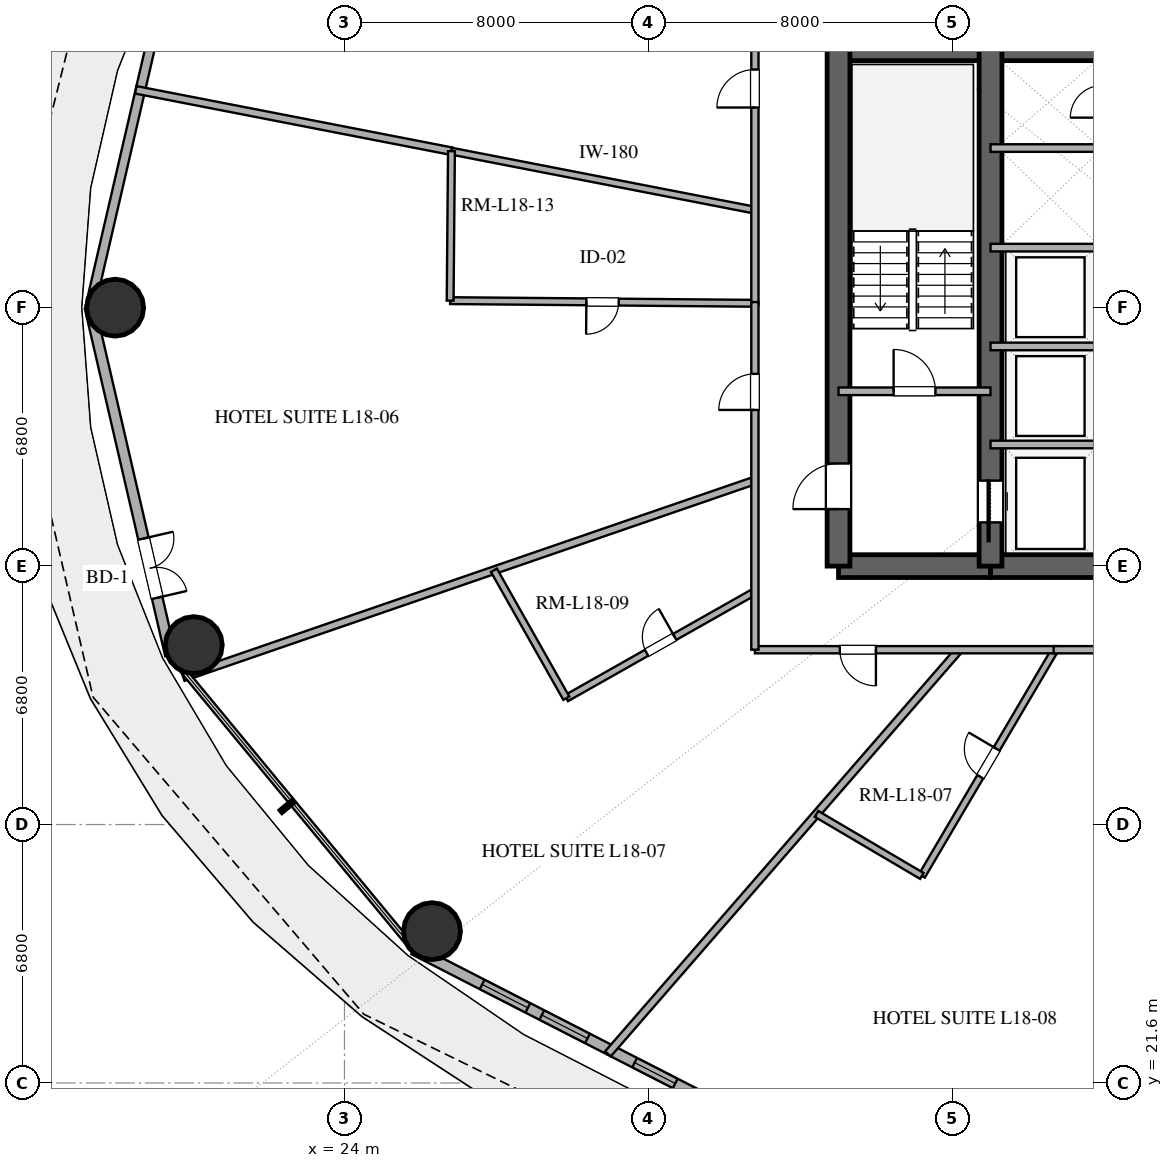
"""IFC4 building model, lengths in metres.
Left out: names, types, materials, properties, quantities, classifications, styles, units other than length and angle.
Written with IfcOpenShell. Run it as: python <this file> out.ifc"""

import sys

from ifc_helpers import new_model, si_unit, direction, frame, frame_2d, origin, origin_2d, place, context, subcontext, project, spatial, rectangle, hollow_circle, extrude, element, fill, save


model = new_model("IFC4")
c1 = context("Model", 3, precision=1e-05, world=origin(), true_north=direction((0.0, 1.0)))
c2 = subcontext(c1, "Body", "Model", "MODEL_VIEW")
j1 = project(units=[si_unit("LENGTHUNIT", "METRE"), si_unit("PLANEANGLEUNIT", "RADIAN")], contexts=[c1])
p1 = place(None, origin())
s1 = spatial("IfcSite", under=j1, at=p1, CompositionType="ELEMENT")
p2 = place(p1, origin())
s2 = spatial("IfcBuilding", under=s1, at=p2, CompositionType="ELEMENT")
p3 = place(p2, frame((0.0, 0.0, 75.0)))
s3 = spatial("IfcBuildingStorey", under=s2, at=p3, CompositionType="ELEMENT", Elevation=75.0)
p4 = place(p3, frame((37.0, 35.2, 0.0), z_axis=(0.0, 0.0, 1.0), x_axis=(1.0, 0.0, 0.0)))
e1 = element("IfcWall", 1, at=p4, inside=s3, PredefinedType="SHEAR", context=c2, shape_type="SweptSolid", body=[
    extrude(rectangle(XDim=4.0, YDim=0.6, at=frame_2d((2.0, 0.0))), origin(), (0.0, 0.0, 1.0), 3.25),
])
p5 = place(p3, frame((41.0, 35.2, 0.0), z_axis=(0.0, 0.0, 1.0), x_axis=(1.0, 0.0, 0.0)))
e2 = element("IfcWall", 2, at=p5, inside=s3, PredefinedType="SHEAR", context=c2, shape_type="SweptSolid", body=[
    extrude(rectangle(XDim=14.0, YDim=0.6, at=frame_2d((7.0, 0.0))), origin(), (0.0, 0.0, 1.0), 3.25),
])
p6 = place(p5, frame((6.1, 0.0, 0.0)))
e3 = element("IfcOpeningElement", 3, at=p6, cuts=e2, PredefinedType="OPENING", context=c2, shape_type="SweptSolid", body=[
    extrude(rectangle(XDim=1.8, YDim=2.25, at=frame_2d((0.9, 1.125))), frame((0.0, 0.31, 0.0), z_axis=(0.0, -1.0, 0.0), x_axis=(1.0, 0.0, 0.0)), (0.0, 0.0, 1.0), 0.62),
])
p7 = place(p3, frame((37.0, 48.8, 0.0), z_axis=(0.0, 0.0, 1.0), x_axis=(1.0, 0.0, 0.0)))
e4 = element("IfcWall", 4, at=p7, inside=s3, PredefinedType="SHEAR", context=c2, shape_type="SweptSolid", body=[
    extrude(rectangle(XDim=4.0, YDim=0.6, at=frame_2d((2.0, 0.0))), origin(), (0.0, 0.0, 1.0), 3.25),
])
p8 = place(p3, frame((41.0, 48.8, 0.0), z_axis=(0.0, 0.0, 1.0), x_axis=(1.0, 0.0, 0.0)))
e5 = element("IfcWall", 5, at=p8, inside=s3, PredefinedType="SHEAR", context=c2, shape_type="SweptSolid", body=[
    extrude(rectangle(XDim=14.0, YDim=0.6, at=frame_2d((7.0, 0.0))), origin(), (0.0, 0.0, 1.0), 3.25),
])
p9 = place(p8, frame((6.1, 0.0, 0.0)))
e6 = element("IfcOpeningElement", 6, at=p9, cuts=e5, PredefinedType="OPENING", context=c2, shape_type="SweptSolid", body=[
    extrude(rectangle(XDim=1.8, YDim=2.25, at=frame_2d((0.9, 1.125))), frame((0.0, 0.31, 0.0), z_axis=(0.0, -1.0, 0.0), x_axis=(1.0, 0.0, 0.0)), (0.0, 0.0, 1.0), 0.62),
])
p10 = place(p3, frame((37.0, 35.2, 0.0), z_axis=(0.0, 0.0, 1.0), x_axis=(0.0, 1.0, 0.0)))
e7 = element("IfcWall", 7, at=p10, inside=s3, PredefinedType="SHEAR", context=c2, shape_type="SweptSolid", body=[
    extrude(rectangle(XDim=13.6, YDim=0.6, at=frame_2d((6.8, 0.0))), origin(), (0.0, 0.0, 1.0), 3.25),
])
p11 = place(p10, frame((1.5, 0.0, 0.0)))
e8 = element("IfcOpeningElement", 8, at=p11, cuts=e7, PredefinedType="OPENING", context=c2, shape_type="SweptSolid", body=[
    extrude(rectangle(XDim=1.2, YDim=2.15, at=frame_2d((0.6, 1.075))), frame((0.0, 0.31, 0.0), z_axis=(0.0, -1.0, 0.0), x_axis=(1.0, 0.0, 0.0)), (0.0, 0.0, 1.0), 0.62),
])
p12 = place(p3, frame((41.0, 35.2, 0.0), z_axis=(0.0, 0.0, 1.0), x_axis=(0.0, 1.0, 0.0)))
e9 = element("IfcWall", 9, at=p12, inside=s3, PredefinedType="SHEAR", context=c2, shape_type="SweptSolid", body=[
    extrude(rectangle(XDim=13.6, YDim=0.6, at=frame_2d((6.8, 0.0))), origin(), (0.0, 0.0, 1.0), 3.25),
])
p13 = place(p12, frame((1.15, 0.0, 0.0)))
e10 = element("IfcOpeningElement", 10, at=p13, cuts=e9, PredefinedType="OPENING", context=c2, shape_type="SweptSolid", body=[
    extrude(rectangle(XDim=1.1, YDim=2.2, at=frame_2d((0.55, 1.1))), frame((0.0, 0.31, 0.0), z_axis=(0.0, -1.0, 0.0), x_axis=(1.0, 0.0, 0.0)), (0.0, 0.0, 1.0), 0.62),
])
for number, where, z_axis, x_axis in (
    (11, (17.965, 42.0, 0.0), (0.0, 0.0, 1.0), (1.0, 0.0, 0.0)),
    (12, (20.034, 33.122, 0.0), (0.0, 0.0, 1.0), (1.0, 0.0, 0.0)),
    (13, (26.303, 25.595, 0.0), (0.0, 0.0, 1.0), (1.0, 0.0, 0.0)),
):
    element("IfcColumn", number, at=place(p3, frame(where, z_axis=z_axis, x_axis=x_axis)), inside=s3, PredefinedType="COLUMN", context=c2, shape_type="SweptSolid", body=[
        extrude(hollow_circle(Radius=0.75, WallThickness=0.04, at=origin_2d()), origin(), (0.0, 0.0, 1.0), 3.25),
    ])
p14 = place(p3, frame((19.419, 51.138, 0.0), z_axis=(0.0, 0.0, 1.0), x_axis=(-0.225454452941, -0.974253709076, 0.0)))
e14 = element("IfcWall", 14, at=p14, inside=s3, PredefinedType="SOLIDWALL", context=c2, shape_type="SweptSolid", body=[
    extrude(rectangle(XDim=9.38, YDim=0.25, at=frame_2d((4.69, 0.0))), origin(), (0.0, 0.0, 1.0), 3.25),
])
p15 = place(p3, frame((17.304, 42.0, 0.0), z_axis=(0.0, 0.0, 1.0), x_axis=(0.225454452941, -0.974253709076, 0.0)))
e15 = element("IfcWall", 15, at=p15, inside=s3, PredefinedType="SOLIDWALL", context=c2, shape_type="SweptSolid", body=[
    extrude(rectangle(XDim=9.38, YDim=0.28, at=frame_2d((4.69, 0.0))), origin(), (0.0, 0.0, 1.0), 3.25),
])
p16 = place(p15, frame((6.235, 0.0, 0.0)))
e16 = element("IfcOpeningElement", 16, at=p16, cuts=e15, PredefinedType="OPENING", context=c2, shape_type="SweptSolid", body=[
    extrude(rectangle(XDim=1.6, YDim=2.25, at=frame_2d((0.8, 1.125))), frame((0.0, 0.15, 0.0), z_axis=(0.0, -1.0, 0.0), x_axis=(1.0, 0.0, 0.0)), (0.0, 0.0, 1.0), 0.3),
])
p17 = place(p3, frame((25.826, 25.114, 0.0), z_axis=(0.0, 0.0, 1.0), x_axis=(0.889853976658, -0.456245438581, 0.0)))
e17 = element("IfcWall", 17, at=p17, inside=s3, PredefinedType="SOLIDWALL", context=c2, shape_type="SweptSolid", body=[
    extrude(rectangle(XDim=11.346, YDim=0.28, at=frame_2d((5.673, 0.0))), origin(), (0.0, 0.0, 1.0), 3.25),
])
p18 = place(p17, frame((2.02, 0.0, 0.85)))
e18 = element("IfcOpeningElement", 18, at=p18, cuts=e17, PredefinedType="OPENING", context=c2, shape_type="SweptSolid", body=[
    extrude(rectangle(XDim=1.35, YDim=1.8, at=frame_2d((0.675, 0.9))), frame((0.0, 0.15, 0.0), z_axis=(0.0, -1.0, 0.0), x_axis=(1.0, 0.0, 0.0)), (0.0, 0.0, 1.0), 0.3),
])
p19 = place(p17, frame((3.784, 0.0, 0.85)))
e19 = element("IfcOpeningElement", 19, at=p19, cuts=e17, PredefinedType="OPENING", context=c2, shape_type="SweptSolid", body=[
    extrude(rectangle(XDim=1.35, YDim=1.8, at=frame_2d((0.675, 0.9))), frame((0.0, 0.15, 0.0), z_axis=(0.0, -1.0, 0.0), x_axis=(1.0, 0.0, 0.0)), (0.0, 0.0, 1.0), 0.3),
])
p20 = place(p17, frame((6.529, 0.0, 0.85)))
e20 = element("IfcOpeningElement", 20, at=p20, cuts=e17, PredefinedType="OPENING", context=c2, shape_type="SweptSolid", body=[
    extrude(rectangle(XDim=1.2, YDim=1.8, at=frame_2d((0.6, 0.9))), frame((0.0, 0.15, 0.0), z_axis=(0.0, -1.0, 0.0), x_axis=(1.0, 0.0, 0.0)), (0.0, 0.0, 1.0), 0.3),
])
p21 = place(p17, frame((8.21, 0.0, 0.85)))
e21 = element("IfcOpeningElement", 21, at=p21, cuts=e17, PredefinedType="OPENING", context=c2, shape_type="SweptSolid", body=[
    extrude(rectangle(XDim=1.2, YDim=1.8, at=frame_2d((0.6, 0.9))), frame((0.0, 0.15, 0.0), z_axis=(0.0, -1.0, 0.0), x_axis=(1.0, 0.0, 0.0)), (0.0, 0.0, 1.0), 0.3),
])
p22 = place(p3, frame((37.0, 39.8, 0.0), z_axis=(0.0, 0.0, 1.0), x_axis=(1.0, 0.0, 0.0)))
e22 = element("IfcWall", 22, at=p22, inside=s3, PredefinedType="SOLIDWALL", context=c2, shape_type="SweptSolid", body=[
    extrude(rectangle(XDim=4.0, YDim=0.2, at=frame_2d((2.0, 0.0))), origin(), (0.0, 0.0, 1.0), 2.61),
])
p23 = place(p22, frame((1.45, 0.0, 0.0)))
e23 = element("IfcOpeningElement", 23, at=p23, cuts=e22, PredefinedType="OPENING", context=c2, shape_type="SweptSolid", body=[
    extrude(rectangle(XDim=1.1, YDim=2.15, at=frame_2d((0.55, 1.075))), frame((0.0, 0.11, 0.0), z_axis=(0.0, -1.0, 0.0), x_axis=(1.0, 0.0, 0.0)), (0.0, 0.0, 1.0), 0.22),
])
for number, where, z_axis, x_axis in (
    (24, (41.0, 38.4, 0.0), (0.0, 0.0, 1.0), (1.0, 0.0, 0.0)),
    (25, (41.0, 46.2, 0.0), (0.0, 0.0, 1.0), (1.0, 0.0, 0.0)),
    (26, (41.0, 40.98, 0.0), (0.0, 0.0, 1.0), (1.0, 0.0, 0.0)),
    (27, (41.0, 43.58, 0.0), (0.0, 0.0, 1.0), (1.0, 0.0, 0.0)),
):
    element("IfcWall", number, at=place(p3, frame(where, z_axis=z_axis, x_axis=x_axis)), inside=s3, PredefinedType="SOLIDWALL", context=c2, shape_type="SweptSolid", body=[
        extrude(rectangle(XDim=2.95, YDim=0.2, at=frame_2d((1.475, 0.0))), origin(), (0.0, 0.0, 1.0), 2.61),
    ])
p24 = place(p3, frame((43.467, 18.681, 0.0), z_axis=(0.0, 0.0, 1.0), x_axis=(0.190799326792, 0.981629062781, 0.0)))
e28 = element("IfcWall", 28, at=p24, inside=s3, PredefinedType="PARTITIONING", context=c2, shape_type="SweptSolid", body=[
    extrude(rectangle(XDim=14.587, YDim=0.2, at=frame_2d((7.293, 0.0))), origin(), (0.0, 0.0, 1.0), 2.61),
])
p25 = place(p3, frame((34.8, 37.455, 0.0), z_axis=(0.0, 0.0, 1.0), x_axis=(-0.945518845989, -0.325567369186, 0.0)))
e29 = element("IfcWall", 29, at=p25, inside=s3, PredefinedType="PARTITIONING", context=c2, shape_type="SweptSolid", body=[
    extrude(rectangle(XDim=15.909, YDim=0.2, at=frame_2d((7.955, 0.0))), origin(), (0.0, 0.0, 1.0), 2.61),
])
p26 = place(p3, frame((18.508, 47.733, 0.0), z_axis=(0.0, 0.0, 1.0), x_axis=(0.981626048747, -0.190814832812, 0.0)))
e30 = element("IfcWall", 30, at=p26, inside=s3, PredefinedType="PARTITIONING", context=c2, shape_type="SweptSolid", body=[
    extrude(rectangle(XDim=8.462, YDim=0.2, at=frame_2d((4.231, 0.0))), origin(), (0.0, 0.0, 1.0), 2.61),
])
p27 = place(p3, frame((40.177, 33.0, 0.0), z_axis=(0.0, 0.0, 1.0), x_axis=(-0.656066321773, -0.754703240641, 0.0)))
e31 = element("IfcWall", 31, at=p27, inside=s3, PredefinedType="PARTITIONING", context=c2, shape_type="SweptSolid", body=[
    extrude(rectangle(XDim=14.091, YDim=0.2, at=frame_2d((7.045, 0.0))), origin(), (0.0, 0.0, 1.0), 2.61),
])
p28 = place(p3, frame((26.815, 46.118, 0.0), z_axis=(0.0, 0.0, 1.0), x_axis=(0.981631630513, -0.190786115787, 0.0)))
e32 = element("IfcWall", 32, at=p28, inside=s3, PredefinedType="PLUMBINGWALL", context=c2, shape_type="SweptSolid", body=[
    extrude(rectangle(XDim=8.135, YDim=0.18, at=frame_2d((4.067, 0.0))), origin(), (0.0, 0.0, 1.0), 2.61),
])
p29 = place(p3, frame((34.8, 42.115, 0.0), z_axis=(0.0, 0.0, 1.0), x_axis=(-0.999961832732, 0.008736880358, 0.0)))
e33 = element("IfcWall", 33, at=p29, inside=s3, PredefinedType="PLUMBINGWALL", context=c2, shape_type="SweptSolid", body=[
    extrude(rectangle(XDim=8.02, YDim=0.18, at=frame_2d((4.01, 0.0))), origin(), (0.0, 0.0, 1.0), 2.61),
])
p30 = place(p29, frame((3.585, 0.0, 0.0)))
e34 = element("IfcOpeningElement", 34, at=p30, cuts=e33, PredefinedType="OPENING", context=c2, shape_type="SweptSolid", body=[
    extrude(rectangle(XDim=0.85, YDim=2.1, at=frame_2d((0.425, 1.05))), frame((0.0, 0.1, 0.0), z_axis=(0.0, -1.0, 0.0), x_axis=(1.0, 0.0, 0.0)), (0.0, 0.0, 1.0), 0.2),
])
p31 = place(p3, frame((39.193, 27.048, 0.0), z_axis=(0.0, 0.0, 1.0), x_axis=(0.507529744585, 0.861634236995, 0.0)))
e35 = element("IfcWall", 35, at=p31, inside=s3, PredefinedType="PLUMBINGWALL", context=c2, shape_type="SweptSolid", body=[
    extrude(rectangle(XDim=6.908, YDim=0.18, at=frame_2d((3.454, 0.0))), origin(), (0.0, 0.0, 1.0), 2.61),
])
p32 = place(p31, frame((3.029, 0.0, 0.0)))
e36 = element("IfcOpeningElement", 36, at=p32, cuts=e35, PredefinedType="OPENING", context=c2, shape_type="SweptSolid", body=[
    extrude(rectangle(XDim=0.85, YDim=2.1, at=frame_2d((0.425, 1.05))), frame((0.0, 0.1, 0.0), z_axis=(0.0, -1.0, 0.0), x_axis=(1.0, 0.0, 0.0)), (0.0, 0.0, 1.0), 0.2),
])
p33 = place(p3, frame((34.8, 42.083, 0.0), z_axis=(0.0, 0.0, 1.0), x_axis=(0.0, 1.0, 0.0)))
e37 = element("IfcWall", 37, at=p33, inside=s3, PredefinedType="PARTITIONING", context=c2, shape_type="SweptSolid", body=[
    extrude(rectangle(XDim=8.917, YDim=0.19, at=frame_2d((4.458, 0.0))), origin(), (0.0, 0.0, 1.0), 2.61),
])
p34 = place(p33, frame((5.183, 0.0, 0.0)))
e38 = element("IfcOpeningElement", 38, at=p34, cuts=e37, PredefinedType="OPENING", context=c2, shape_type="SweptSolid", body=[
    extrude(rectangle(XDim=1.0, YDim=2.2, at=frame_2d((0.5, 1.1))), frame((0.0, 0.105, 0.0), z_axis=(0.0, -1.0, 0.0), x_axis=(1.0, 0.0, 0.0)), (0.0, 0.0, 1.0), 0.21),
])
p35 = place(p3, frame((29.837, 31.724, 0.0), z_axis=(0.0, 0.0, 1.0), x_axis=(0.870364197206, 0.492408533865, 0.0)))
e39 = element("IfcWall", 39, at=p35, inside=s3, PredefinedType="PLUMBINGWALL", context=c2, shape_type="SweptSolid", body=[
    extrude(rectangle(XDim=5.702, YDim=0.18, at=frame_2d((2.851, 0.0))), origin(), (0.0, 0.0, 1.0), 2.61),
])
p36 = place(p35, frame((2.426, 0.0, 0.0)))
e40 = element("IfcOpeningElement", 40, at=p36, cuts=e39, PredefinedType="OPENING", context=c2, shape_type="SweptSolid", body=[
    extrude(rectangle(XDim=0.85, YDim=2.1, at=frame_2d((0.425, 1.05))), frame((0.0, 0.1, 0.0), z_axis=(0.0, -1.0, 0.0), x_axis=(1.0, 0.0, 0.0)), (0.0, 0.0, 1.0), 0.2),
])
p37 = place(p3, frame((42.736, 33.0, 0.0), z_axis=(0.0, 0.0, 1.0), x_axis=(-1.0, 0.0, 0.0)))
e41 = element("IfcWall", 41, at=p37, inside=s3, PredefinedType="PARTITIONING", context=c2, shape_type="SweptSolid", body=[
    extrude(rectangle(XDim=7.936, YDim=0.19, at=frame_2d((3.968, 0.0))), origin(), (0.0, 0.0, 1.0), 2.61),
])
p38 = place(p37, frame((4.751, 0.0, 0.0)))
e42 = element("IfcOpeningElement", 42, at=p38, cuts=e41, PredefinedType="OPENING", context=c2, shape_type="SweptSolid", body=[
    extrude(rectangle(XDim=0.95, YDim=2.15, at=frame_2d((0.475, 1.075))), frame((0.0, 0.105, 0.0), z_axis=(0.0, -1.0, 0.0), x_axis=(1.0, 0.0, 0.0)), (0.0, 0.0, 1.0), 0.21),
])
p39 = place(p3, frame((51.133, 33.0, 0.0), z_axis=(0.0, 0.0, 1.0), x_axis=(-1.0, 0.0, 0.0)))
e43 = element("IfcWall", 43, at=p39, inside=s3, PredefinedType="PARTITIONING", context=c2, shape_type="SweptSolid", body=[
    extrude(rectangle(XDim=8.471, YDim=0.19, at=frame_2d((4.236, 0.0))), origin(), (0.0, 0.0, 1.0), 2.61),
])
p40 = place(p39, frame((1.957, 0.0, 0.0)))
e44 = element("IfcOpeningElement", 44, at=p40, cuts=e43, PredefinedType="OPENING", context=c2, shape_type="SweptSolid", body=[
    extrude(rectangle(XDim=1.0, YDim=2.2, at=frame_2d((0.5, 1.1))), frame((0.0, 0.105, 0.0), z_axis=(0.0, -1.0, 0.0), x_axis=(1.0, 0.0, 0.0)), (0.0, 0.0, 1.0), 0.21),
])
p41 = place(p39, frame((6.185, 0.0, 0.0)))
e45 = element("IfcOpeningElement", 45, at=p41, cuts=e43, PredefinedType="OPENING", context=c2, shape_type="SweptSolid", body=[
    extrude(rectangle(XDim=0.95, YDim=2.15, at=frame_2d((0.475, 1.075))), frame((0.0, 0.105, 0.0), z_axis=(0.0, -1.0, 0.0), x_axis=(1.0, 0.0, 0.0)), (0.0, 0.0, 1.0), 0.21),
])
p42 = place(p3, frame((34.8, 33.0, 0.0), z_axis=(0.0, 0.0, 1.0), x_axis=(0.0, 1.0, 0.0)))
e46 = element("IfcWall", 46, at=p42, inside=s3, PredefinedType="PARTITIONING", context=c2, shape_type="SweptSolid", body=[
    extrude(rectangle(XDim=9.147, YDim=0.19, at=frame_2d((4.574, 0.0))), origin(), (0.0, 0.0, 1.0), 2.61),
])
p43 = place(p42, frame((6.309, 0.0, 0.0)))
e47 = element("IfcOpeningElement", 47, at=p43, cuts=e46, PredefinedType="OPENING", context=c2, shape_type="SweptSolid", body=[
    extrude(rectangle(XDim=0.95, YDim=2.15, at=frame_2d((0.475, 1.075))), frame((0.0, 0.105, 0.0), z_axis=(0.0, -1.0, 0.0), x_axis=(1.0, 0.0, 0.0)), (0.0, 0.0, 1.0), 0.21),
])
p44 = place(p3, frame((26.781, 42.185, 0.0), z_axis=(0.0, 0.0, 1.0), x_axis=(0.008691005249, 0.999962232501, 0.0)))
e48 = element("IfcWall", 48, at=p44, inside=s3, PredefinedType="PLUMBINGWALL", context=c2, shape_type="SweptSolid", body=[
    extrude(rectangle(XDim=3.933, YDim=0.18, at=frame_2d((1.966, 0.0))), origin(), (0.0, 0.0, 1.0), 2.61),
])
p45 = place(p3, frame((27.933, 35.09, 0.0), z_axis=(0.0, 0.0, 1.0), x_axis=(0.492429534147, -0.870352315962, 0.0)))
e49 = element("IfcWall", 49, at=p45, inside=s3, PredefinedType="PLUMBINGWALL", context=c2, shape_type="SweptSolid", body=[
    extrude(rectangle(XDim=3.868, YDim=0.18, at=frame_2d((1.934, 0.0))), origin(), (0.0, 0.0, 1.0), 2.61),
])
p46 = place(p3, frame((36.421, 28.68, 0.0), z_axis=(0.0, 0.0, 1.0), x_axis=(0.861637458593, -0.507524275232, 0.0)))
e50 = element("IfcWall", 50, at=p46, inside=s3, PredefinedType="PLUMBINGWALL", context=c2, shape_type="SweptSolid", body=[
    extrude(rectangle(XDim=3.216, YDim=0.18, at=frame_2d((1.608, 0.0))), origin(), (0.0, 0.0, 1.0), 2.61),
])
p47 = place(p16, origin())
e51 = element("IfcDoor", 51, at=p47, inside=s3, OperationType="DOUBLE_DOOR_SINGLE_SWING", PredefinedType="DOOR", context=c2, shape_type="SweptSolid", body=[
    extrude(rectangle(XDim=1.6, YDim=2.25, at=frame_2d((0.8, 1.125))), frame((0.0, 0.025, 0.0), z_axis=(0.0, -1.0, 0.0), x_axis=(1.0, 0.0, 0.0)), (0.0, 0.0, 1.0), 0.05),
])
fill(e16, e51)
p48 = place(p18, origin())
e52 = element("IfcWindow", 52, at=p48, inside=s3, PartitioningType="SINGLE_PANEL", PredefinedType="WINDOW", context=c2, shape_type="SweptSolid", body=[
    extrude(rectangle(XDim=1.35, YDim=1.8, at=frame_2d((0.675, 0.9))), frame((0.0, 0.03, 0.0), z_axis=(0.0, -1.0, 0.0), x_axis=(1.0, 0.0, 0.0)), (0.0, 0.0, 1.0), 0.06),
])
fill(e18, e52)
p49 = place(p19, origin())
e53 = element("IfcWindow", 53, at=p49, inside=s3, PartitioningType="SINGLE_PANEL", PredefinedType="WINDOW", context=c2, shape_type="SweptSolid", body=[
    extrude(rectangle(XDim=1.35, YDim=1.8, at=frame_2d((0.675, 0.9))), frame((0.0, 0.03, 0.0), z_axis=(0.0, -1.0, 0.0), x_axis=(1.0, 0.0, 0.0)), (0.0, 0.0, 1.0), 0.06),
])
fill(e19, e53)
p50 = place(p20, origin())
e54 = element("IfcWindow", 54, at=p50, inside=s3, PartitioningType="SINGLE_PANEL", PredefinedType="WINDOW", context=c2, shape_type="SweptSolid", body=[
    extrude(rectangle(XDim=1.2, YDim=1.8, at=frame_2d((0.6, 0.9))), frame((0.0, 0.03, 0.0), z_axis=(0.0, -1.0, 0.0), x_axis=(1.0, 0.0, 0.0)), (0.0, 0.0, 1.0), 0.06),
])
fill(e20, e54)
p51 = place(p13, origin())
e55 = element("IfcDoor", 55, at=p51, inside=s3, OperationType="SLIDING_TO_LEFT", PredefinedType="DOOR", context=c2, shape_type="SweptSolid", body=[
    extrude(rectangle(XDim=1.1, YDim=2.2, at=frame_2d((0.55, 1.1))), frame((0.0, 0.025, 0.0), z_axis=(0.0, -1.0, 0.0), x_axis=(1.0, 0.0, 0.0)), (0.0, 0.0, 1.0), 0.05),
])
fill(e10, e55)
p52 = place(p11, origin())
e56 = element("IfcDoor", 56, at=p52, inside=s3, OperationType="SINGLE_SWING_LEFT", PredefinedType="DOOR", context=c2, shape_type="SweptSolid", body=[
    extrude(rectangle(XDim=1.2, YDim=2.15, at=frame_2d((0.6, 1.075))), frame((0.0, 0.025, 0.0), z_axis=(0.0, -1.0, 0.0), x_axis=(1.0, 0.0, 0.0)), (0.0, 0.0, 1.0), 0.05),
])
fill(e8, e56)
p53 = place(p23, origin())
e57 = element("IfcDoor", 57, at=p53, inside=s3, OperationType="SINGLE_SWING_LEFT", PredefinedType="DOOR", context=c2, shape_type="SweptSolid", body=[
    extrude(rectangle(XDim=1.1, YDim=2.15, at=frame_2d((0.55, 1.075))), frame((0.0, 0.025, 0.0), z_axis=(0.0, -1.0, 0.0), x_axis=(1.0, 0.0, 0.0)), (0.0, 0.0, 1.0), 0.05),
])
fill(e23, e57)
p54 = place(p30, origin())
e58 = element("IfcDoor", 58, at=p54, inside=s3, OperationType="SINGLE_SWING_RIGHT", PredefinedType="DOOR", context=c2, shape_type="SweptSolid", body=[
    extrude(rectangle(XDim=0.85, YDim=2.1, at=frame_2d((0.425, 1.05))), frame((0.0, 0.025, 0.0), z_axis=(0.0, -1.0, 0.0), x_axis=(1.0, 0.0, 0.0)), (0.0, 0.0, 1.0), 0.05),
])
fill(e34, e58)
p55 = place(p32, origin())
e59 = element("IfcDoor", 59, at=p55, inside=s3, OperationType="SINGLE_SWING_RIGHT", PredefinedType="DOOR", context=c2, shape_type="SweptSolid", body=[
    extrude(rectangle(XDim=0.85, YDim=2.1, at=frame_2d((0.425, 1.05))), frame((0.0, 0.025, 0.0), z_axis=(0.0, -1.0, 0.0), x_axis=(1.0, 0.0, 0.0)), (0.0, 0.0, 1.0), 0.05),
])
fill(e36, e59)
p56 = place(p34, origin())
e60 = element("IfcDoor", 60, at=p56, inside=s3, OperationType="SINGLE_SWING_LEFT", PredefinedType="DOOR", context=c2, shape_type="SweptSolid", body=[
    extrude(rectangle(XDim=1.0, YDim=2.2, at=frame_2d((0.5, 1.1))), frame((0.0, 0.025, 0.0), z_axis=(0.0, -1.0, 0.0), x_axis=(1.0, 0.0, 0.0)), (0.0, 0.0, 1.0), 0.05),
])
fill(e38, e60)
p57 = place(p36, origin())
e61 = element("IfcDoor", 61, at=p57, inside=s3, OperationType="SINGLE_SWING_RIGHT", PredefinedType="DOOR", context=c2, shape_type="SweptSolid", body=[
    extrude(rectangle(XDim=0.85, YDim=2.1, at=frame_2d((0.425, 1.05))), frame((0.0, 0.025, 0.0), z_axis=(0.0, -1.0, 0.0), x_axis=(1.0, 0.0, 0.0)), (0.0, 0.0, 1.0), 0.05),
])
fill(e40, e61)
p58 = place(p38, origin())
e62 = element("IfcDoor", 62, at=p58, inside=s3, OperationType="SINGLE_SWING_LEFT", PredefinedType="DOOR", context=c2, shape_type="SweptSolid", body=[
    extrude(rectangle(XDim=0.95, YDim=2.15, at=frame_2d((0.475, 1.075))), frame((0.0, 0.025, 0.0), z_axis=(0.0, -1.0, 0.0), x_axis=(1.0, 0.0, 0.0)), (0.0, 0.0, 1.0), 0.05),
])
fill(e42, e62)
p59 = place(p43, origin())
e63 = element("IfcDoor", 63, at=p59, inside=s3, OperationType="SINGLE_SWING_LEFT", PredefinedType="DOOR", context=c2, shape_type="SweptSolid", body=[
    extrude(rectangle(XDim=0.95, YDim=2.15, at=frame_2d((0.475, 1.075))), frame((0.0, 0.025, 0.0), z_axis=(0.0, -1.0, 0.0), x_axis=(1.0, 0.0, 0.0)), (0.0, 0.0, 1.0), 0.05),
])
fill(e47, e63)
save(model, sys.argv[1])
